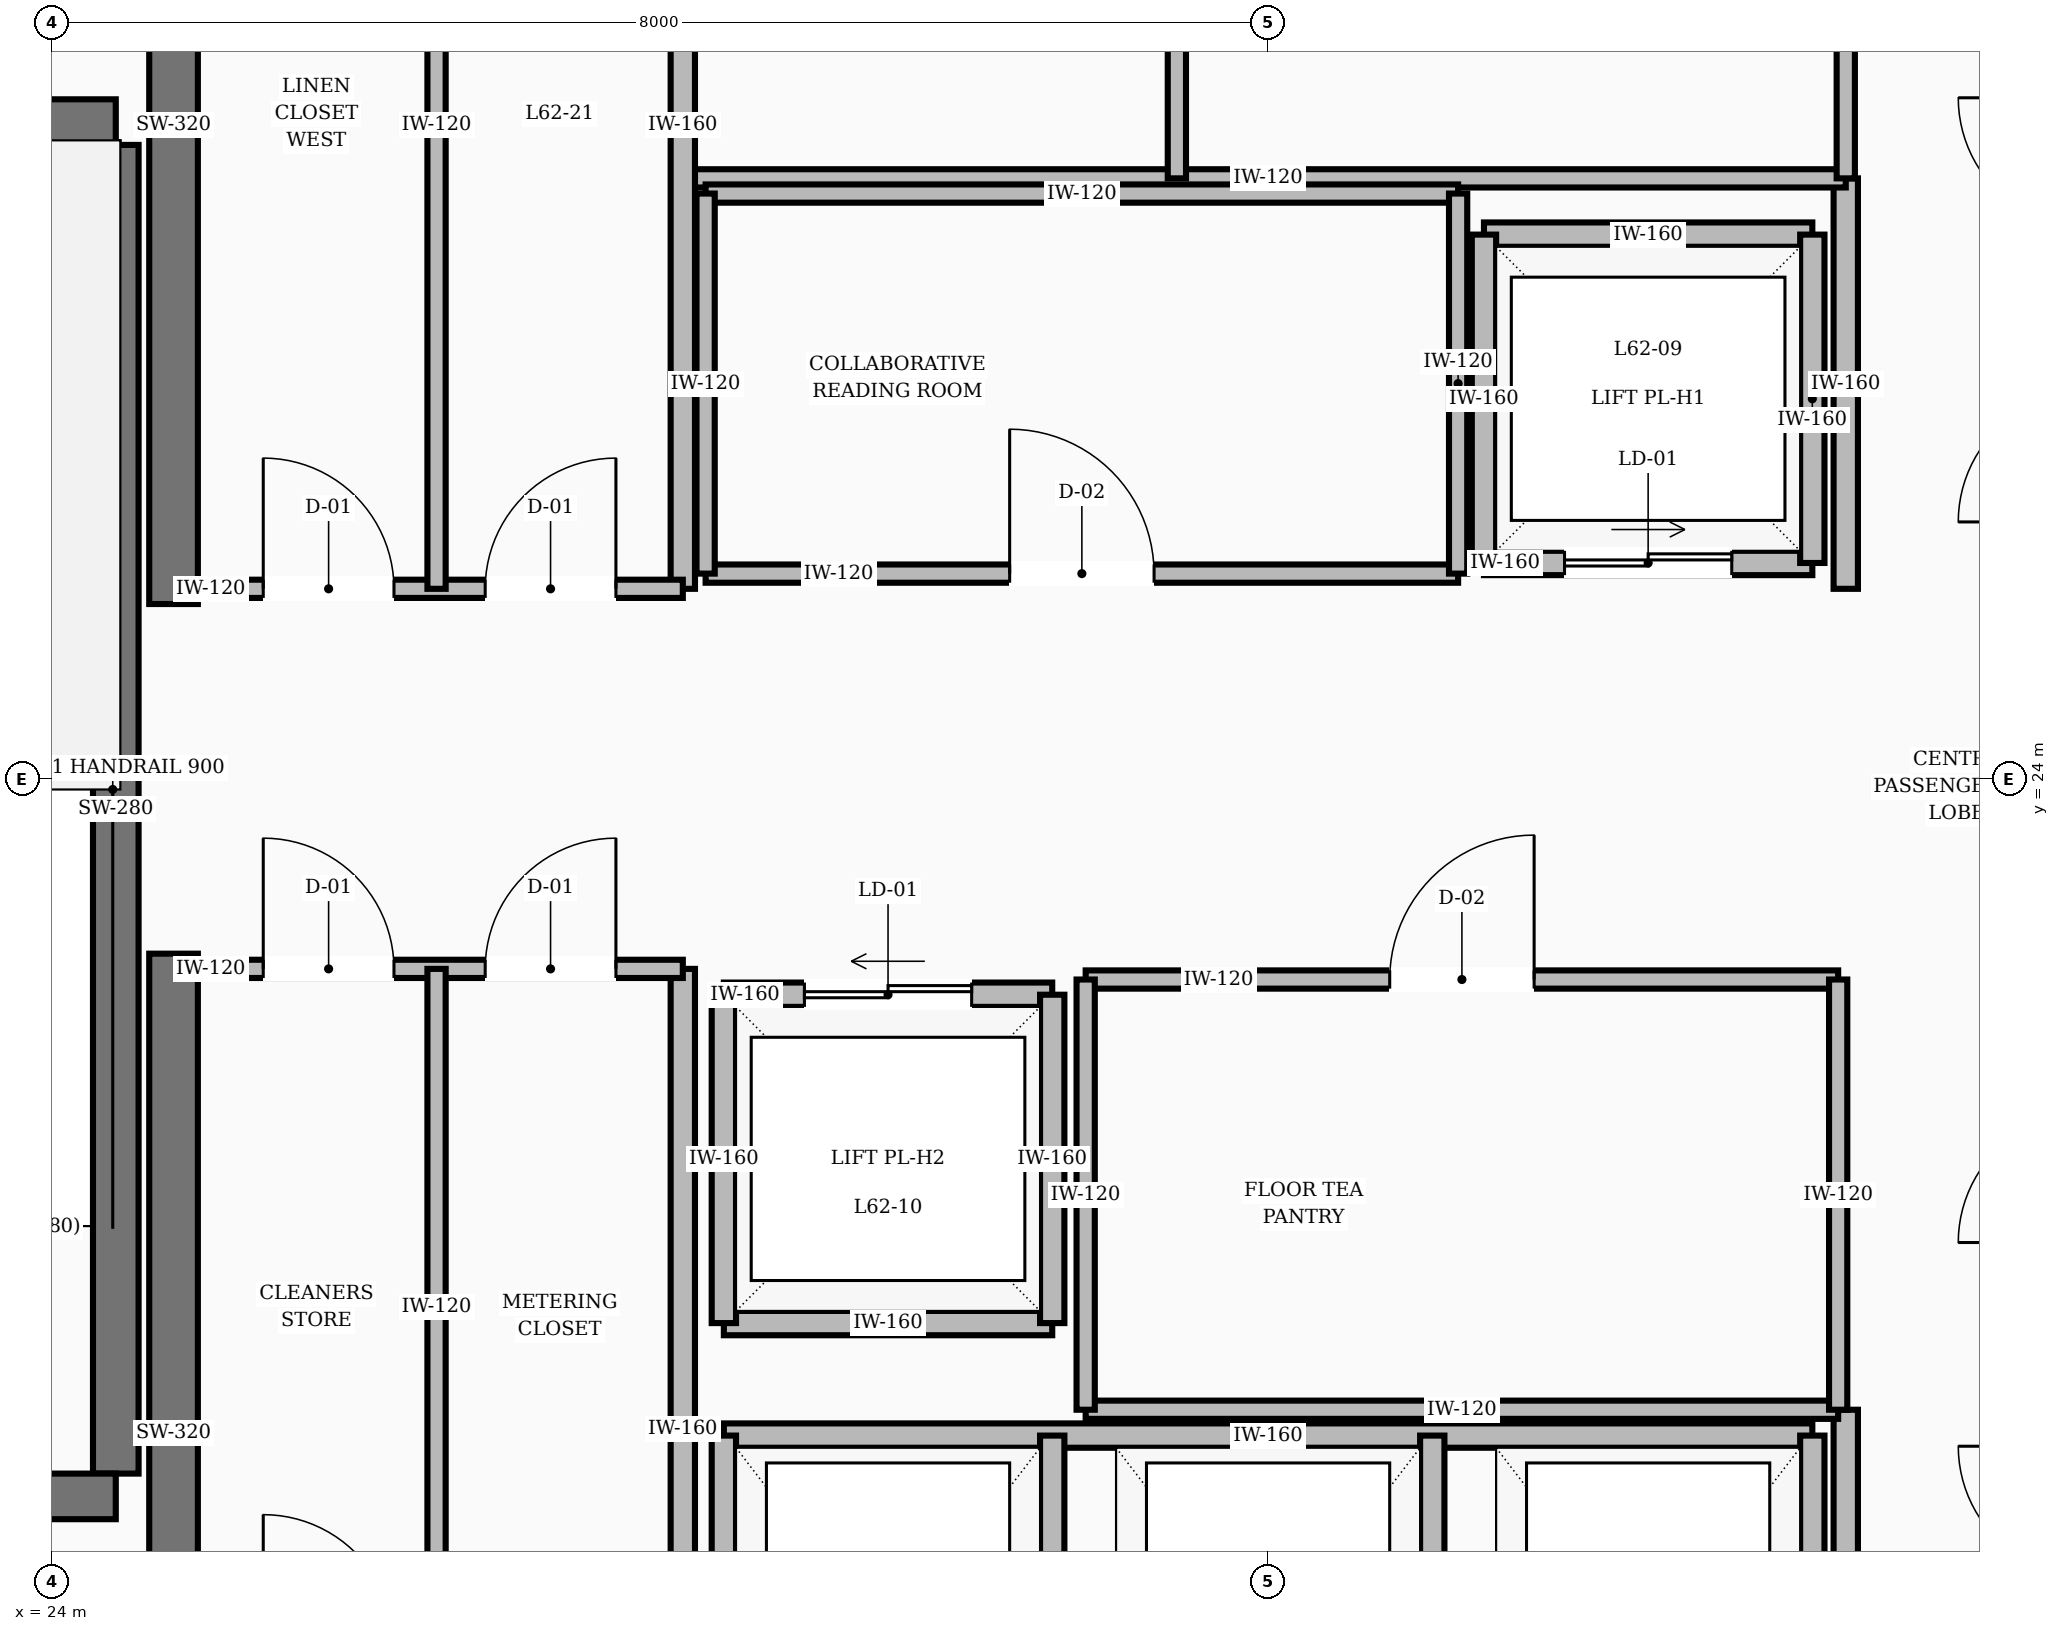
"""IFC4 building model, lengths in metres.
Left out: names, types, materials, properties, quantities, classifications, styles, units other than length and angle.
Written with IfcOpenShell. Run it as: python <this file> out.ifc"""

import sys

from ifc_helpers import new_model, si_unit, direction, frame, frame_2d, origin, place, context, subcontext, project, spatial, rectangle, extrude, element, fill, save


model = new_model("IFC4")
c1 = context("Model", 3, precision=1e-05, world=origin(), true_north=direction((0.0, 1.0)))
c2 = subcontext(c1, "Body", "Model", "MODEL_VIEW")
j1 = project(units=[si_unit("LENGTHUNIT", "METRE"), si_unit("PLANEANGLEUNIT", "RADIAN")], contexts=[c1])
p1 = place(None, origin())
s1 = spatial("IfcSite", under=j1, at=p1, CompositionType="ELEMENT")
p2 = place(p1, origin())
s2 = spatial("IfcBuilding", under=s1, at=p2, CompositionType="ELEMENT")
p3 = place(p2, frame((0.0, 0.0, 214.8)))
s3 = spatial("IfcBuildingStorey", under=s2, at=p3, CompositionType="ELEMENT", Elevation=214.8)
for number, where, z_axis, x_axis in (
    (1, (24.8, 16.55, 0.0), (0.0, 0.0, 1.0), (0.0, 1.0, 0.0)),
    (2, (24.8, 25.15, 0.0), (0.0, 0.0, 1.0), (0.0, 1.0, 0.0)),
):
    element("IfcWall", number, at=place(p3, frame(where, z_axis=z_axis, x_axis=x_axis)), inside=s3, PredefinedType="SHEAR", context=c2, shape_type="SweptSolid", body=[
        extrude(rectangle(XDim=6.3, YDim=0.32, at=frame_2d((3.15, 0.0))), origin(), (0.0, 0.0, 1.0), 3.6),
    ])
p4 = place(p3, frame((24.42, 19.43, 0.0), z_axis=(0.0, 0.0, 1.0), x_axis=(0.0, 1.0, 0.0)))
e3 = element("IfcWall", 3, at=p4, inside=s3, PredefinedType="SHEAR", context=c2, shape_type="SweptSolid", body=[
    extrude(rectangle(XDim=8.74, YDim=0.3, at=frame_2d((4.37, 0.0))), origin(), (0.0, 0.0, 1.0), 3.6),
])
p5 = place(p3, frame((20.82, 19.28, 0.0), z_axis=(0.0, 0.0, 1.0), x_axis=(1.0, 0.0, 0.0)))
e4 = element("IfcWall", 4, at=p5, inside=s3, PredefinedType="SHEAR", context=c2, shape_type="SweptSolid", body=[
    extrude(rectangle(XDim=3.6, YDim=0.3, at=frame_2d((1.8, 0.0))), origin(), (0.0, 0.0, 1.0), 3.6),
])
p6 = place(p5, frame((1.3, 0.0, 0.0)))
e5 = element("IfcOpeningElement", 5, at=p6, cuts=e4, PredefinedType="OPENING", context=c2, shape_type="SweptSolid", body=[
    extrude(rectangle(XDim=1.1, YDim=2.1, at=frame_2d((0.55, 1.05))), frame((0.0, 0.16, 0.0), z_axis=(0.0, -1.0, 0.0), x_axis=(1.0, 0.0, 0.0)), (0.0, 0.0, 1.0), 0.32),
])
p7 = place(p3, frame((20.82, 28.32, 0.0), z_axis=(0.0, 0.0, 1.0), x_axis=(1.0, 0.0, 0.0)))
e6 = element("IfcWall", 6, at=p7, inside=s3, PredefinedType="SHEAR", context=c2, shape_type="SweptSolid", body=[
    extrude(rectangle(XDim=3.6, YDim=0.3, at=frame_2d((1.8, 0.0))), origin(), (0.0, 0.0, 1.0), 3.6),
])
p8 = place(p3, frame((35.8, 16.55, 0.0), z_axis=(0.0, 0.0, 1.0), x_axis=(0.0, 1.0, 0.0)))
e7 = element("IfcWall", 7, at=p8, inside=s3, PredefinedType="SOLIDWALL", context=c2, shape_type="SweptSolid", body=[
    extrude(rectangle(XDim=3.3, YDim=0.16, at=frame_2d((1.65, 0.0))), origin(), (0.0, 0.0, 1.0), 2.87),
])
p9 = place(p3, frame((35.8, 25.25, 0.0), z_axis=(0.0, 0.0, 1.0), x_axis=(0.0, 1.0, 0.0)))
e8 = element("IfcWall", 8, at=p9, inside=s3, PredefinedType="SOLIDWALL", context=c2, shape_type="SweptSolid", body=[
    extrude(rectangle(XDim=2.7, YDim=0.16, at=frame_2d((1.35, 0.0))), origin(), (0.0, 0.0, 1.0), 2.87),
])
p10 = place(p3, frame((33.42, 25.42, 0.0), z_axis=(0.0, 0.0, 1.0), x_axis=(1.0, 0.0, 0.0)))
e9 = element("IfcWall", 9, at=p10, inside=s3, PredefinedType="SOLIDWALL", context=c2, shape_type="SweptSolid", body=[
    extrude(rectangle(XDim=2.16, YDim=0.16, at=frame_2d((1.08, 0.0))), origin(), (0.0, 0.0, 1.0), 2.87),
])
p11 = place(p10, frame((0.53, 0.0, 0.0)))
e10 = element("IfcOpeningElement", 10, at=p11, cuts=e9, PredefinedType="OPENING", context=c2, shape_type="SweptSolid", body=[
    extrude(rectangle(XDim=1.1, YDim=2.15, at=frame_2d((0.55, 1.075))), frame((0.0, 0.09, 0.0), z_axis=(0.0, -1.0, 0.0), x_axis=(1.0, 0.0, 0.0)), (0.0, 0.0, 1.0), 0.18),
])
for number, where, z_axis, x_axis in (
    (11, (33.42, 27.58, 0.0), (0.0, 0.0, 1.0), (1.0, 0.0, 0.0)),
    (12, (33.42, 25.42, 0.0), (0.0, 0.0, 1.0), (0.0, 1.0, 0.0)),
    (13, (35.58, 25.42, 0.0), (0.0, 0.0, 1.0), (0.0, 1.0, 0.0)),
):
    element("IfcWall", number, at=place(p3, frame(where, z_axis=z_axis, x_axis=x_axis)), inside=s3, PredefinedType="SOLIDWALL", context=c2, shape_type="SweptSolid", body=[
        extrude(rectangle(XDim=2.16, YDim=0.16, at=frame_2d((1.08, 0.0))), origin(), (0.0, 0.0, 1.0), 2.87),
    ])
p12 = place(p3, frame((28.42, 22.58, 0.0), z_axis=(0.0, 0.0, 1.0), x_axis=(1.0, 0.0, 0.0)))
e14 = element("IfcWall", 14, at=p12, inside=s3, PredefinedType="SOLIDWALL", context=c2, shape_type="SweptSolid", body=[
    extrude(rectangle(XDim=2.16, YDim=0.16, at=frame_2d((1.08, 0.0))), origin(), (0.0, 0.0, 1.0), 2.87),
])
p13 = place(p12, frame((0.53, 0.0, 0.0)))
e15 = element("IfcOpeningElement", 15, at=p13, cuts=e14, PredefinedType="OPENING", context=c2, shape_type="SweptSolid", body=[
    extrude(rectangle(XDim=1.1, YDim=2.15, at=frame_2d((0.55, 1.075))), frame((0.0, 0.09, 0.0), z_axis=(0.0, -1.0, 0.0), x_axis=(1.0, 0.0, 0.0)), (0.0, 0.0, 1.0), 0.18),
])
for number, where, z_axis, x_axis in (
    (16, (28.42, 20.42, 0.0), (0.0, 0.0, 1.0), (1.0, 0.0, 0.0)),
    (17, (28.42, 20.42, 0.0), (0.0, 0.0, 1.0), (0.0, 1.0, 0.0)),
    (18, (30.58, 20.42, 0.0), (0.0, 0.0, 1.0), (0.0, 1.0, 0.0)),
):
    element("IfcWall", number, at=place(p3, frame(where, z_axis=z_axis, x_axis=x_axis)), inside=s3, PredefinedType="SOLIDWALL", context=c2, shape_type="SweptSolid", body=[
        extrude(rectangle(XDim=2.16, YDim=0.16, at=frame_2d((1.08, 0.0))), origin(), (0.0, 0.0, 1.0), 2.87),
    ])
p14 = place(p3, frame((28.42, 19.68, 0.0), z_axis=(0.0, 0.0, 1.0), x_axis=(1.0, 0.0, 0.0)))
e19 = element("IfcWall", 19, at=p14, inside=s3, PredefinedType="SOLIDWALL", context=c2, shape_type="SweptSolid", body=[
    extrude(rectangle(XDim=7.16, YDim=0.16, at=frame_2d((3.58, 0.0))), origin(), (0.0, 0.0, 1.0), 2.87),
])
for number, where, z_axis, x_axis in (
    (20, (28.42, 16.92, 0.0), (0.0, 0.0, 1.0), (0.0, 1.0, 0.0)),
    (21, (30.58, 16.92, 0.0), (0.0, 0.0, 1.0), (0.0, 1.0, 0.0)),
    (22, (33.08, 16.92, 0.0), (0.0, 0.0, 1.0), (0.0, 1.0, 0.0)),
    (23, (35.58, 16.92, 0.0), (0.0, 0.0, 1.0), (0.0, 1.0, 0.0)),
):
    element("IfcWall", number, at=place(p3, frame(where, z_axis=z_axis, x_axis=x_axis)), inside=s3, PredefinedType="SOLIDWALL", context=c2, shape_type="SweptSolid", body=[
        extrude(rectangle(XDim=2.76, YDim=0.16, at=frame_2d((1.38, 0.0))), origin(), (0.0, 0.0, 1.0), 2.87),
    ])
p15 = place(p3, frame((28.2, 27.95, 0.0), z_axis=(0.0, 0.0, 1.0), x_axis=(1.0, 0.0, 0.0)))
e24 = element("IfcWall", 24, at=p15, inside=s3, PredefinedType="PARTITIONING", context=c2, shape_type="SweptSolid", body=[
    extrude(rectangle(XDim=7.6, YDim=0.12, at=frame_2d((3.8, 0.0))), origin(), (0.0, 0.0, 1.0), 2.87),
])
p16 = place(p3, frame((35.8, 27.95, 0.0), z_axis=(0.0, 0.0, 1.0), x_axis=(0.0, 1.0, 0.0)))
e25 = element("IfcWall", 25, at=p16, inside=s3, PredefinedType="PARTITIONING", context=c2, shape_type="SweptSolid", body=[
    extrude(rectangle(XDim=3.5, YDim=0.12, at=frame_2d((1.75, 0.0))), origin(), (0.0, 0.0, 1.0), 2.87),
])
p17 = place(p16, frame((1.275, 0.0, 0.0)))
e26 = element("IfcOpeningElement", 26, at=p17, cuts=e25, PredefinedType="OPENING", context=c2, shape_type="SweptSolid", body=[
    extrude(rectangle(XDim=0.95, YDim=2.1, at=frame_2d((0.475, 1.05))), frame((0.0, 0.07, 0.0), z_axis=(0.0, -1.0, 0.0), x_axis=(1.0, 0.0, 0.0)), (0.0, 0.0, 1.0), 0.14),
])
p18 = place(p3, frame((28.3, 25.35, 0.0), z_axis=(0.0, 0.0, 1.0), x_axis=(1.0, 0.0, 0.0)))
e27 = element("IfcWall", 27, at=p18, inside=s3, PredefinedType="PARTITIONING", context=c2, shape_type="SweptSolid", body=[
    extrude(rectangle(XDim=4.95, YDim=0.12, at=frame_2d((2.475, 0.0))), origin(), (0.0, 0.0, 1.0), 2.87),
])
p19 = place(p18, frame((2.0, 0.0, 0.0)))
e28 = element("IfcOpeningElement", 28, at=p19, cuts=e27, PredefinedType="OPENING", context=c2, shape_type="SweptSolid", body=[
    extrude(rectangle(XDim=0.95, YDim=2.1, at=frame_2d((0.475, 1.05))), frame((0.0, 0.07, 0.0), z_axis=(0.0, -1.0, 0.0), x_axis=(1.0, 0.0, 0.0)), (0.0, 0.0, 1.0), 0.14),
])
p20 = place(p3, frame((28.3, 27.85, 0.0), z_axis=(0.0, 0.0, 1.0), x_axis=(1.0, 0.0, 0.0)))
e29 = element("IfcWall", 29, at=p20, inside=s3, PredefinedType="PARTITIONING", context=c2, shape_type="SweptSolid", body=[
    extrude(rectangle(XDim=4.95, YDim=0.12, at=frame_2d((2.475, 0.0))), origin(), (0.0, 0.0, 1.0), 2.87),
])
for number, where, z_axis, x_axis in (
    (30, (28.3, 25.35, 0.0), (0.0, 0.0, 1.0), (0.0, 1.0, 0.0)),
    (31, (33.25, 25.35, 0.0), (0.0, 0.0, 1.0), (0.0, 1.0, 0.0)),
):
    element("IfcWall", number, at=place(p3, frame(where, z_axis=z_axis, x_axis=x_axis)), inside=s3, PredefinedType="PARTITIONING", context=c2, shape_type="SweptSolid", body=[
        extrude(rectangle(XDim=2.5, YDim=0.12, at=frame_2d((1.25, 0.0))), origin(), (0.0, 0.0, 1.0), 2.87),
    ])
p21 = place(p3, frame((30.8, 22.68, 0.0), z_axis=(0.0, 0.0, 1.0), x_axis=(1.0, 0.0, 0.0)))
e32 = element("IfcWall", 32, at=p21, inside=s3, PredefinedType="PARTITIONING", context=c2, shape_type="SweptSolid", body=[
    extrude(rectangle(XDim=4.95, YDim=0.12, at=frame_2d((2.475, 0.0))), origin(), (0.0, 0.0, 1.0), 2.87),
])
p22 = place(p21, frame((2.0, 0.0, 0.0)))
e33 = element("IfcOpeningElement", 33, at=p22, cuts=e32, PredefinedType="OPENING", context=c2, shape_type="SweptSolid", body=[
    extrude(rectangle(XDim=0.95, YDim=2.1, at=frame_2d((0.475, 1.05))), frame((0.0, 0.07, 0.0), z_axis=(0.0, -1.0, 0.0), x_axis=(1.0, 0.0, 0.0)), (0.0, 0.0, 1.0), 0.14),
])
p23 = place(p3, frame((30.8, 19.85, 0.0), z_axis=(0.0, 0.0, 1.0), x_axis=(1.0, 0.0, 0.0)))
e34 = element("IfcWall", 34, at=p23, inside=s3, PredefinedType="PARTITIONING", context=c2, shape_type="SweptSolid", body=[
    extrude(rectangle(XDim=4.95, YDim=0.12, at=frame_2d((2.475, 0.0))), origin(), (0.0, 0.0, 1.0), 2.87),
])
for number, where, z_axis, x_axis in (
    (35, (30.8, 19.85, 0.0), (0.0, 0.0, 1.0), (0.0, 1.0, 0.0)),
    (36, (35.75, 19.85, 0.0), (0.0, 0.0, 1.0), (0.0, 1.0, 0.0)),
):
    element("IfcWall", number, at=place(p3, frame(where, z_axis=z_axis, x_axis=x_axis)), inside=s3, PredefinedType="PARTITIONING", context=c2, shape_type="SweptSolid", body=[
        extrude(rectangle(XDim=2.83, YDim=0.12, at=frame_2d((1.415, 0.0))), origin(), (0.0, 0.0, 1.0), 2.87),
    ])
p24 = place(p3, frame((28.15, 16.7, 0.0), z_axis=(0.0, 0.0, 1.0), x_axis=(0.0, 1.0, 0.0)))
e37 = element("IfcWall", 37, at=p24, inside=s3, PredefinedType="SOLIDWALL", context=c2, shape_type="SweptSolid", body=[
    extrude(rectangle(XDim=6.05, YDim=0.16, at=frame_2d((3.025, 0.0))), origin(), (0.0, 0.0, 1.0), 2.87),
])
p25 = place(p3, frame((28.15, 25.25, 0.0), z_axis=(0.0, 0.0, 1.0), x_axis=(0.0, 1.0, 0.0)))
e38 = element("IfcWall", 38, at=p25, inside=s3, PredefinedType="SOLIDWALL", context=c2, shape_type="SweptSolid", body=[
    extrude(rectangle(XDim=6.1, YDim=0.16, at=frame_2d((3.05, 0.0))), origin(), (0.0, 0.0, 1.0), 2.87),
])
p26 = place(p3, frame((24.95, 25.25, 0.0), z_axis=(0.0, 0.0, 1.0), x_axis=(1.0, 0.0, 0.0)))
e39 = element("IfcWall", 39, at=p26, inside=s3, PredefinedType="PARTITIONING", context=c2, shape_type="SweptSolid", body=[
    extrude(rectangle(XDim=3.2, YDim=0.12, at=frame_2d((1.6, 0.0))), origin(), (0.0, 0.0, 1.0), 2.87),
])
p27 = place(p26, frame((1.125, 0.0, 0.0)))
e40 = element("IfcOpeningElement", 40, at=p27, cuts=e39, PredefinedType="OPENING", context=c2, shape_type="SweptSolid", body=[
    extrude(rectangle(XDim=0.95, YDim=2.1, at=frame_2d((0.475, 1.05))), frame((0.0, 0.07, 0.0), z_axis=(0.0, -1.0, 0.0), x_axis=(1.0, 0.0, 0.0)), (0.0, 0.0, 1.0), 0.14),
])
p28 = place(p3, frame((24.95, 22.75, 0.0), z_axis=(0.0, 0.0, 1.0), x_axis=(1.0, 0.0, 0.0)))
e41 = element("IfcWall", 41, at=p28, inside=s3, PredefinedType="PARTITIONING", context=c2, shape_type="SweptSolid", body=[
    extrude(rectangle(XDim=3.2, YDim=0.12, at=frame_2d((1.6, 0.0))), origin(), (0.0, 0.0, 1.0), 2.87),
])
p29 = place(p28, frame((1.125, 0.0, 0.0)))
e42 = element("IfcOpeningElement", 42, at=p29, cuts=e41, PredefinedType="OPENING", context=c2, shape_type="SweptSolid", body=[
    extrude(rectangle(XDim=0.95, YDim=2.1, at=frame_2d((0.475, 1.05))), frame((0.0, 0.07, 0.0), z_axis=(0.0, -1.0, 0.0), x_axis=(1.0, 0.0, 0.0)), (0.0, 0.0, 1.0), 0.14),
])
p30 = place(p3, frame((24.95, 27.55, 0.0), z_axis=(0.0, 0.0, 1.0), x_axis=(1.0, 0.0, 0.0)))
e43 = element("IfcWall", 43, at=p30, inside=s3, PredefinedType="PARTITIONING", context=c2, shape_type="SweptSolid", body=[
    extrude(rectangle(XDim=3.2, YDim=0.12, at=frame_2d((1.6, 0.0))), origin(), (0.0, 0.0, 1.0), 2.87),
])
p31 = place(p30, frame((1.125, 0.0, 0.0)))
e44 = element("IfcOpeningElement", 44, at=p31, cuts=e43, PredefinedType="OPENING", context=c2, shape_type="SweptSolid", body=[
    extrude(rectangle(XDim=0.95, YDim=2.1, at=frame_2d((0.475, 1.05))), frame((0.0, 0.07, 0.0), z_axis=(0.0, -1.0, 0.0), x_axis=(1.0, 0.0, 0.0)), (0.0, 0.0, 1.0), 0.14),
])
p32 = place(p11, origin())
e45 = element("IfcDoor", 45, at=p32, inside=s3, OperationType="SLIDING_TO_RIGHT", PredefinedType="DOOR", context=c2, shape_type="SweptSolid", body=[
    extrude(rectangle(XDim=1.1, YDim=2.15, at=frame_2d((0.55, 1.075))), frame((0.0, 0.025, 0.0), z_axis=(0.0, -1.0, 0.0), x_axis=(1.0, 0.0, 0.0)), (0.0, 0.0, 1.0), 0.05),
])
fill(e10, e45)
p33 = place(p13, origin())
e46 = element("IfcDoor", 46, at=p33, inside=s3, OperationType="SLIDING_TO_LEFT", PredefinedType="DOOR", context=c2, shape_type="SweptSolid", body=[
    extrude(rectangle(XDim=1.1, YDim=2.15, at=frame_2d((0.55, 1.075))), frame((0.0, 0.025, 0.0), z_axis=(0.0, -1.0, 0.0), x_axis=(1.0, 0.0, 0.0)), (0.0, 0.0, 1.0), 0.05),
])
fill(e15, e46)
p34 = place(p19, origin())
e47 = element("IfcDoor", 47, at=p34, inside=s3, OperationType="SINGLE_SWING_RIGHT", PredefinedType="DOOR", context=c2, shape_type="SweptSolid", body=[
    extrude(rectangle(XDim=0.95, YDim=2.1, at=frame_2d((0.475, 1.05))), frame((0.0, 0.025, 0.0), z_axis=(0.0, -1.0, 0.0), x_axis=(1.0, 0.0, 0.0)), (0.0, 0.0, 1.0), 0.05),
])
fill(e28, e47)
p35 = place(p22, origin())
e48 = element("IfcDoor", 48, at=p35, inside=s3, OperationType="SINGLE_SWING_LEFT", PredefinedType="DOOR", context=c2, shape_type="SweptSolid", body=[
    extrude(rectangle(XDim=0.95, YDim=2.1, at=frame_2d((0.475, 1.05))), frame((0.0, 0.025, 0.0), z_axis=(0.0, -1.0, 0.0), x_axis=(1.0, 0.0, 0.0)), (0.0, 0.0, 1.0), 0.05),
])
fill(e33, e48)
p36 = place(p27, origin())
e49 = element("IfcDoor", 49, at=p36, inside=s3, OperationType="SINGLE_SWING_RIGHT", PredefinedType="DOOR", context=c2, shape_type="SweptSolid", body=[
    extrude(rectangle(XDim=0.95, YDim=2.1, at=frame_2d((0.475, 1.05))), frame((0.0, 0.025, 0.0), z_axis=(0.0, -1.0, 0.0), x_axis=(1.0, 0.0, 0.0)), (0.0, 0.0, 1.0), 0.05),
])
fill(e40, e49)
p37 = place(p31, origin())
e50 = element("IfcDoor", 50, at=p37, inside=s3, OperationType="SINGLE_SWING_LEFT", PredefinedType="DOOR", context=c2, shape_type="SweptSolid", body=[
    extrude(rectangle(XDim=0.95, YDim=2.1, at=frame_2d((0.475, 1.05))), frame((0.0, 0.025, 0.0), z_axis=(0.0, -1.0, 0.0), x_axis=(1.0, 0.0, 0.0)), (0.0, 0.0, 1.0), 0.05),
])
fill(e44, e50)
p38 = place(p29, origin())
e51 = element("IfcDoor", 51, at=p38, inside=s3, OperationType="SINGLE_SWING_RIGHT", PredefinedType="DOOR", context=c2, shape_type="SweptSolid", body=[
    extrude(rectangle(XDim=0.95, YDim=2.1, at=frame_2d((0.475, 1.05))), frame((0.0, 0.025, 0.0), z_axis=(0.0, -1.0, 0.0), x_axis=(1.0, 0.0, 0.0)), (0.0, 0.0, 1.0), 0.05),
])
fill(e42, e51)
save(model, sys.argv[1])
